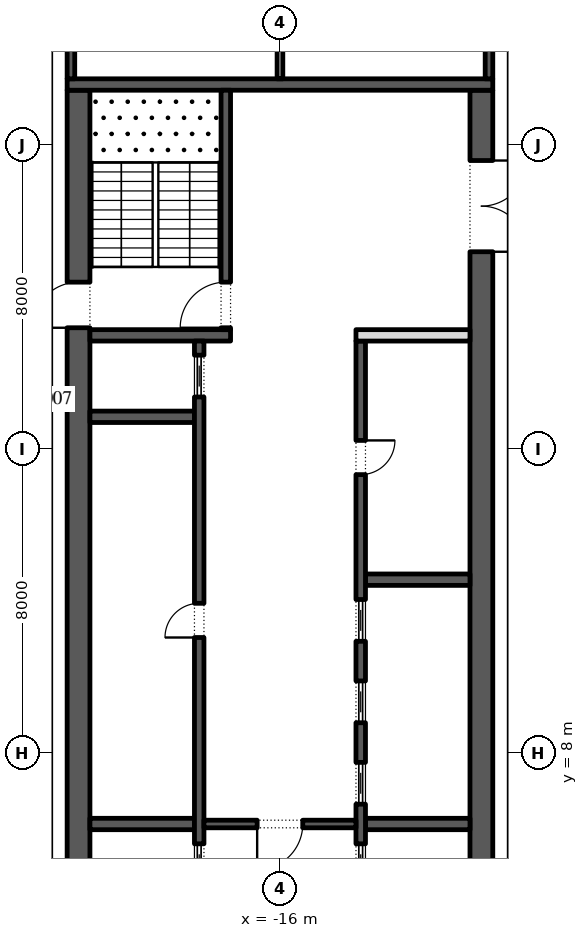
"""IFC4 building model, lengths in metres.
Left out: names, types, materials, properties, quantities, classifications, styles, units other than length and angle.
Written with IfcOpenShell. Run it as: python <this file> out.ifc"""

import sys

from ifc_helpers import new_model, si_unit, direction, frame, frame_2d, origin, place, context, subcontext, project, spatial, rectangle, extrude, element, fill, save


model = new_model("IFC4")
c1 = context("Model", 3, precision=1e-05, world=origin(), true_north=direction((0.0, 1.0)))
c2 = subcontext(c1, "Body", "Model", "MODEL_VIEW")
j1 = project(units=[si_unit("LENGTHUNIT", "METRE"), si_unit("PLANEANGLEUNIT", "RADIAN")], contexts=[c1])
p1 = place(None, origin())
s1 = spatial("IfcSite", under=j1, at=p1, CompositionType="ELEMENT")
p2 = place(p1, origin())
s2 = spatial("IfcBuilding", under=s1, at=p2, CompositionType="ELEMENT")
p3 = place(p2, frame((0.0, 0.0, 259.8)))
s3 = spatial("IfcBuildingStorey", under=s2, at=p3, CompositionType="ELEMENT", Elevation=259.8)
p4 = place(p3, frame((-21.359, 48.678, 0.0), z_axis=(0.0, 0.0, 1.0), x_axis=(-0.224949198343, -0.974370493275, 0.0)))
e1 = element("IfcWall", 1, at=p4, inside=s3, PredefinedType="STANDARD", context=c2, shape_type="SweptSolid", body=[
    extrude(rectangle(XDim=49.5, YDim=0.3, at=frame_2d((24.75, 0.0))), origin(), (0.0, 0.0, 1.0), 4.0),
])
p5 = place(p4, frame((1.157, 0.0, 0.45)))
e2 = element("IfcOpeningElement", 2, at=p5, cuts=e1, PredefinedType="OPENING", context=c2, shape_type="SweptSolid", body=[
    extrude(rectangle(XDim=4.5, YDim=3.05, at=frame_2d((2.25, 1.525))), frame((0.0, 0.16, 0.0), z_axis=(0.0, -1.0, 0.0), x_axis=(1.0, 0.0, 0.0)), (0.0, 0.0, 1.0), 0.32),
])
p6 = place(p4, frame((9.171, 0.0, 0.0)))
e3 = element("IfcOpeningElement", 3, at=p6, cuts=e1, PredefinedType="OPENING", context=c2, shape_type="SweptSolid", body=[
    extrude(rectangle(XDim=2.4, YDim=3.5, at=frame_2d((1.2, 1.75))), frame((0.0, 0.16, 0.0), z_axis=(0.0, -1.0, 0.0), x_axis=(1.0, 0.0, 0.0)), (0.0, 0.0, 1.0), 0.32),
])
p7 = place(p4, frame((15.236, 0.0, 0.45)))
e4 = element("IfcOpeningElement", 4, at=p7, cuts=e1, PredefinedType="OPENING", context=c2, shape_type="SweptSolid", body=[
    extrude(rectangle(XDim=4.5, YDim=3.05, at=frame_2d((2.25, 1.525))), frame((0.0, 0.16, 0.0), z_axis=(0.0, -1.0, 0.0), x_axis=(1.0, 0.0, 0.0)), (0.0, 0.0, 1.0), 0.32),
])
p8 = place(p4, frame((22.35, 0.0, 0.45)))
e5 = element("IfcOpeningElement", 5, at=p8, cuts=e1, PredefinedType="OPENING", context=c2, shape_type="SweptSolid", body=[
    extrude(rectangle(XDim=4.5, YDim=3.05, at=frame_2d((2.25, 1.525))), frame((0.0, 0.16, 0.0), z_axis=(0.0, -1.0, 0.0), x_axis=(1.0, 0.0, 0.0)), (0.0, 0.0, 1.0), 0.32),
])
p9 = place(p4, frame((29.464, 0.0, 0.45)))
e6 = element("IfcOpeningElement", 6, at=p9, cuts=e1, PredefinedType="OPENING", context=c2, shape_type="SweptSolid", body=[
    extrude(rectangle(XDim=4.5, YDim=3.05, at=frame_2d((2.25, 1.525))), frame((0.0, 0.16, 0.0), z_axis=(0.0, -1.0, 0.0), x_axis=(1.0, 0.0, 0.0)), (0.0, 0.0, 1.0), 0.32),
])
p10 = place(p4, frame((37.628, 0.0, 0.0)))
e7 = element("IfcOpeningElement", 7, at=p10, cuts=e1, PredefinedType="OPENING", context=c2, shape_type="SweptSolid", body=[
    extrude(rectangle(XDim=2.4, YDim=3.325, at=frame_2d((1.2, 1.663))), frame((0.0, 0.16, 0.0), z_axis=(0.0, -1.0, 0.0), x_axis=(1.0, 0.0, 0.0)), (0.0, 0.0, 1.0), 0.32),
])
p11 = place(p4, frame((43.693, 0.0, 0.45)))
e8 = element("IfcOpeningElement", 8, at=p11, cuts=e1, PredefinedType="OPENING", context=c2, shape_type="SweptSolid", body=[
    extrude(rectangle(XDim=4.5, YDim=2.825, at=frame_2d((2.25, 1.413))), frame((0.0, 0.16, 0.0), z_axis=(0.0, -1.0, 0.0), x_axis=(1.0, 0.0, 0.0)), (0.0, 0.0, 1.0), 0.32),
])
p12 = place(p3, frame((-21.3, -2.45, 0.0), z_axis=(0.0, 0.0, 1.0), x_axis=(0.0, 1.0, 0.0)))
e9 = element("IfcWall", 9, at=p12, inside=s3, PredefinedType="SHEAR", context=c2, shape_type="SweptSolid", body=[
    extrude(rectangle(XDim=27.9, YDim=0.6, at=frame_2d((13.95, 0.0))), origin(), (0.0, 0.0, 1.0), 4.0),
])
p13 = place(p12, frame((5.05, 0.0, 0.0)))
e10 = element("IfcOpeningElement", 10, at=p13, cuts=e9, PredefinedType="OPENING", context=c2, shape_type="SweptSolid", body=[
    extrude(rectangle(XDim=1.2, YDim=2.1, at=frame_2d((0.6, 1.05))), frame((0.0, 0.31, 0.0), z_axis=(0.0, -1.0, 0.0), x_axis=(1.0, 0.0, 0.0)), (0.0, 0.0, 1.0), 0.62),
])
p14 = place(p12, frame((21.65, 0.0, 0.0)))
e11 = element("IfcOpeningElement", 11, at=p14, cuts=e9, PredefinedType="OPENING", context=c2, shape_type="SweptSolid", body=[
    extrude(rectangle(XDim=1.2, YDim=2.1, at=frame_2d((0.6, 1.05))), frame((0.0, 0.31, 0.0), z_axis=(0.0, -1.0, 0.0), x_axis=(1.0, 0.0, 0.0)), (0.0, 0.0, 1.0), 0.62),
])
p15 = place(p3, frame((-10.7, -2.45, 0.0), z_axis=(0.0, 0.0, 1.0), x_axis=(0.0, 1.0, 0.0)))
e12 = element("IfcWall", 12, at=p15, inside=s3, PredefinedType="SHEAR", context=c2, shape_type="SweptSolid", body=[
    extrude(rectangle(XDim=27.9, YDim=0.6, at=frame_2d((13.95, 0.0))), origin(), (0.0, 0.0, 1.0), 4.0),
])
p16 = place(p15, frame((23.65, 0.0, 0.0)))
e13 = element("IfcOpeningElement", 13, at=p16, cuts=e12, PredefinedType="OPENING", context=c2, shape_type="SweptSolid", body=[
    extrude(rectangle(XDim=2.4, YDim=2.1, at=frame_2d((1.2, 1.05))), frame((0.0, 0.31, 0.0), z_axis=(0.0, -1.0, 0.0), x_axis=(1.0, 0.0, 0.0)), (0.0, 0.0, 1.0), 0.62),
])
p17 = place(p15, frame((1.087, 0.0, 0.0)))
e14 = element("IfcOpeningElement", 14, at=p17, cuts=e12, PredefinedType="OPENING", context=c2, shape_type="SweptSolid", body=[
    extrude(rectangle(XDim=0.9, YDim=2.1, at=frame_2d((0.45, 1.05))), frame((0.0, 0.31, 0.0), z_axis=(0.0, -1.0, 0.0), x_axis=(1.0, 0.0, 0.0)), (0.0, 0.0, 1.0), 0.62),
])
p18 = place(p15, frame((4.262, 0.0, 0.0)))
e15 = element("IfcOpeningElement", 15, at=p18, cuts=e12, PredefinedType="OPENING", context=c2, shape_type="SweptSolid", body=[
    extrude(rectangle(XDim=1.0, YDim=2.1, at=frame_2d((0.5, 1.05))), frame((0.0, 0.31, 0.0), z_axis=(0.0, -1.0, 0.0), x_axis=(1.0, 0.0, 0.0)), (0.0, 0.0, 1.0), 0.62),
])
p19 = place(p3, frame((-21.6, 25.6, 0.0), z_axis=(0.0, 0.0, 1.0), x_axis=(1.0, 0.0, 0.0)))
e16 = element("IfcWall", 16, at=p19, inside=s3, PredefinedType="SHEAR", context=c2, shape_type="SweptSolid", body=[
    extrude(rectangle(XDim=11.2, YDim=0.3, at=frame_2d((5.6, 0.0))), origin(), (0.0, 0.0, 1.0), 4.0),
])
p20 = place(p3, frame((-21.0, 19.0, 0.0), z_axis=(0.0, 0.0, 1.0), x_axis=(1.0, 0.0, 0.0)))
e17 = element("IfcWall", 17, at=p20, inside=s3, PredefinedType="SHEAR", context=c2, shape_type="SweptSolid", body=[
    extrude(rectangle(XDim=3.7, YDim=0.3, at=frame_2d((1.85, 0.0))), origin(), (0.0, 0.0, 1.0), 4.0),
])
p21 = place(p3, frame((-17.425, 19.15, 0.0), z_axis=(0.0, 0.0, 1.0), x_axis=(0.0, 1.0, 0.0)))
e18 = element("IfcWall", 18, at=p21, inside=s3, PredefinedType="SHEAR", context=c2, shape_type="SweptSolid", body=[
    extrude(rectangle(XDim=6.3, YDim=0.25, at=frame_2d((3.15, 0.0))), origin(), (0.0, 0.0, 1.0), 4.0),
])
p22 = place(p21, frame((0.05, 0.0, 0.0)))
e19 = element("IfcOpeningElement", 19, at=p22, cuts=e18, PredefinedType="OPENING", context=c2, shape_type="SweptSolid", body=[
    extrude(rectangle(XDim=1.2, YDim=2.1, at=frame_2d((0.6, 1.05))), frame((0.0, 0.135, 0.0), z_axis=(0.0, -1.0, 0.0), x_axis=(1.0, 0.0, 0.0)), (0.0, 0.0, 1.0), 0.27),
])
for number, where, z_axis, x_axis in (
    (20, (-21.0, 6.143, 0.0), (0.0, 0.0, 1.0), (1.0, 0.0, 0.0)),
    (21, (-21.0, 16.857, 0.0), (0.0, 0.0, 1.0), (1.0, 0.0, 0.0)),
):
    element("IfcWall", number, at=place(p3, frame(where, z_axis=z_axis, x_axis=x_axis)), inside=s3, PredefinedType="SHEAR", context=c2, shape_type="SweptSolid", body=[
        extrude(rectangle(XDim=2.75, YDim=0.3, at=frame_2d((1.375, 0.0))), origin(), (0.0, 0.0, 1.0), 4.0),
    ])
p23 = place(p3, frame((-18.125, 4.15, 0.0), z_axis=(0.0, 0.0, 1.0), x_axis=(0.0, 1.0, 0.0)))
e22 = element("IfcWall", 22, at=p23, inside=s3, PredefinedType="SHEAR", context=c2, shape_type="SweptSolid", body=[
    extrude(rectangle(XDim=14.7, YDim=0.25, at=frame_2d((7.35, 0.0))), origin(), (0.0, 0.0, 1.0), 4.0),
])
p24 = place(p23, frame((6.9, 0.0, 0.0)))
e23 = element("IfcOpeningElement", 23, at=p24, cuts=e22, PredefinedType="OPENING", context=c2, shape_type="SweptSolid", body=[
    extrude(rectangle(XDim=0.9, YDim=2.1, at=frame_2d((0.45, 1.05))), frame((0.0, 0.135, 0.0), z_axis=(0.0, -1.0, 0.0), x_axis=(1.0, 0.0, 0.0)), (0.0, 0.0, 1.0), 0.27),
])
p25 = place(p23, frame((0.371, 0.0, 0.0)))
e24 = element("IfcOpeningElement", 24, at=p25, cuts=e22, PredefinedType="OPENING", context=c2, shape_type="SweptSolid", body=[
    extrude(rectangle(XDim=1.1, YDim=2.1, at=frame_2d((0.55, 1.05))), frame((0.0, 0.135, 0.0), z_axis=(0.0, -1.0, 0.0), x_axis=(1.0, 0.0, 0.0)), (0.0, 0.0, 1.0), 0.27),
])
p26 = place(p23, frame((13.229, 0.0, 0.0)))
e25 = element("IfcOpeningElement", 25, at=p26, cuts=e22, PredefinedType="OPENING", context=c2, shape_type="SweptSolid", body=[
    extrude(rectangle(XDim=1.1, YDim=2.1, at=frame_2d((0.55, 1.05))), frame((0.0, 0.135, 0.0), z_axis=(0.0, -1.0, 0.0), x_axis=(1.0, 0.0, 0.0)), (0.0, 0.0, 1.0), 0.27),
])
for number, where, z_axis, x_axis in (
    (26, (-13.75, 6.143, 0.0), (0.0, 0.0, 1.0), (1.0, 0.0, 0.0)),
    (27, (-13.75, 12.571, 0.0), (0.0, 0.0, 1.0), (1.0, 0.0, 0.0)),
):
    element("IfcWall", number, at=place(p3, frame(where, z_axis=z_axis, x_axis=x_axis)), inside=s3, PredefinedType="SHEAR", context=c2, shape_type="SweptSolid", body=[
        extrude(rectangle(XDim=2.75, YDim=0.3, at=frame_2d((1.375, 0.0))), origin(), (0.0, 0.0, 1.0), 4.0),
    ])
p27 = place(p3, frame((-13.875, -2.45, 0.0), z_axis=(0.0, 0.0, 1.0), x_axis=(0.0, 1.0, 0.0)))
e28 = element("IfcWall", 28, at=p27, inside=s3, PredefinedType="SHEAR", context=c2, shape_type="SweptSolid", body=[
    extrude(rectangle(XDim=21.3, YDim=0.25, at=frame_2d((10.65, 0.0))), origin(), (0.0, 0.0, 1.0), 4.0),
])
p28 = place(p27, frame((17.786, 0.0, 0.0)))
e29 = element("IfcOpeningElement", 29, at=p28, cuts=e28, PredefinedType="OPENING", context=c2, shape_type="SweptSolid", body=[
    extrude(rectangle(XDim=0.9, YDim=2.1, at=frame_2d((0.45, 1.05))), frame((0.0, 0.135, 0.0), z_axis=(0.0, -1.0, 0.0), x_axis=(1.0, 0.0, 0.0)), (0.0, 0.0, 1.0), 0.27),
])
p29 = place(p27, frame((6.971, 0.0, 0.0)))
e30 = element("IfcOpeningElement", 30, at=p29, cuts=e28, PredefinedType="OPENING", context=c2, shape_type="SweptSolid", body=[
    extrude(rectangle(XDim=1.1, YDim=2.1, at=frame_2d((0.55, 1.05))), frame((0.0, 0.135, 0.0), z_axis=(0.0, -1.0, 0.0), x_axis=(1.0, 0.0, 0.0)), (0.0, 0.0, 1.0), 0.27),
])
p30 = place(p27, frame((9.114, 0.0, 0.0)))
e31 = element("IfcOpeningElement", 31, at=p30, cuts=e28, PredefinedType="OPENING", context=c2, shape_type="SweptSolid", body=[
    extrude(rectangle(XDim=1.1, YDim=2.1, at=frame_2d((0.55, 1.05))), frame((0.0, 0.135, 0.0), z_axis=(0.0, -1.0, 0.0), x_axis=(1.0, 0.0, 0.0)), (0.0, 0.0, 1.0), 0.27),
])
p31 = place(p27, frame((11.257, 0.0, 0.0)))
e32 = element("IfcOpeningElement", 32, at=p31, cuts=e28, PredefinedType="OPENING", context=c2, shape_type="SweptSolid", body=[
    extrude(rectangle(XDim=1.1, YDim=2.1, at=frame_2d((0.55, 1.05))), frame((0.0, 0.135, 0.0), z_axis=(0.0, -1.0, 0.0), x_axis=(1.0, 0.0, 0.0)), (0.0, 0.0, 1.0), 0.27),
])
p32 = place(p27, frame((13.4, 0.0, 0.0)))
e33 = element("IfcOpeningElement", 33, at=p32, cuts=e28, PredefinedType="OPENING", context=c2, shape_type="SweptSolid", body=[
    extrude(rectangle(XDim=1.1, YDim=2.1, at=frame_2d((0.55, 1.05))), frame((0.0, 0.135, 0.0), z_axis=(0.0, -1.0, 0.0), x_axis=(1.0, 0.0, 0.0)), (0.0, 0.0, 1.0), 0.27),
])
p33 = place(p3, frame((-14.0, 19.0, 0.0), z_axis=(0.0, 0.0, 1.0), x_axis=(1.0, 0.0, 0.0)))
e34 = element("IfcWall", 34, at=p33, inside=s3, PredefinedType="PARTITIONING", context=c2, shape_type="SweptSolid", body=[
    extrude(rectangle(XDim=3.0, YDim=0.3, at=frame_2d((1.5, 0.0))), origin(), (0.0, 0.0, 1.0), 4.0),
])
p34 = place(p3, frame((-18.0, 6.143, 0.0), z_axis=(0.0, 0.0, 1.0), x_axis=(1.0, 0.0, 0.0)))
e35 = element("IfcWall", 35, at=p34, inside=s3, PredefinedType="SHEAR", context=c2, shape_type="SweptSolid", body=[
    extrude(rectangle(XDim=4.0, YDim=0.2, at=frame_2d((2.0, 0.0))), origin(), (0.0, 0.0, 1.0), 4.0),
])
p35 = place(p34, frame((1.4, 0.0, 0.0)))
e36 = element("IfcOpeningElement", 36, at=p35, cuts=e35, PredefinedType="OPENING", context=c2, shape_type="SweptSolid", body=[
    extrude(rectangle(XDim=1.2, YDim=2.1, at=frame_2d((0.6, 1.05))), frame((0.0, 0.11, 0.0), z_axis=(0.0, -1.0, 0.0), x_axis=(1.0, 0.0, 0.0)), (0.0, 0.0, 1.0), 0.22),
])
p36 = place(p3, frame((-21.5, 25.75, 0.0), z_axis=(0.0, 0.0, 1.0), x_axis=(0.0, 1.0, 0.0)))
e37 = element("IfcWall", 37, at=p36, inside=s3, PredefinedType="SHEAR", context=c2, shape_type="SweptSolid", body=[
    extrude(rectangle(XDim=4.75, YDim=0.2, at=frame_2d((2.375, 0.0))), origin(), (0.0, 0.0, 1.0), 4.0),
])
p37 = place(p36, frame((1.925, 0.0, 0.0)))
e38 = element("IfcOpeningElement", 38, at=p37, cuts=e37, PredefinedType="OPENING", context=c2, shape_type="SweptSolid", body=[
    extrude(rectangle(XDim=0.9, YDim=2.1, at=frame_2d((0.45, 1.05))), frame((0.0, 0.11, 0.0), z_axis=(0.0, -1.0, 0.0), x_axis=(1.0, 0.0, 0.0)), (0.0, 0.0, 1.0), 0.22),
])
p38 = place(p3, frame((-10.5, 25.75, 0.0), z_axis=(0.0, 0.0, 1.0), x_axis=(0.0, 1.0, 0.0)))
e39 = element("IfcWall", 39, at=p38, inside=s3, PredefinedType="SHEAR", context=c2, shape_type="SweptSolid", body=[
    extrude(rectangle(XDim=4.75, YDim=0.2, at=frame_2d((2.375, 0.0))), origin(), (0.0, 0.0, 1.0), 4.0),
])
p39 = place(p38, frame((1.925, 0.0, 0.0)))
e40 = element("IfcOpeningElement", 40, at=p39, cuts=e39, PredefinedType="OPENING", context=c2, shape_type="SweptSolid", body=[
    extrude(rectangle(XDim=0.9, YDim=2.1, at=frame_2d((0.45, 1.05))), frame((0.0, 0.11, 0.0), z_axis=(0.0, -1.0, 0.0), x_axis=(1.0, 0.0, 0.0)), (0.0, 0.0, 1.0), 0.22),
])
p40 = place(p3, frame((-16.0, 25.75, 0.0), z_axis=(0.0, 0.0, 1.0), x_axis=(0.0, 1.0, 0.0)))
e41 = element("IfcWall", 41, at=p40, inside=s3, PredefinedType="PARTITIONING", context=c2, shape_type="SweptSolid", body=[
    extrude(rectangle(XDim=4.75, YDim=0.15, at=frame_2d((2.375, 0.0))), origin(), (0.0, 0.0, 1.0), 4.0),
])
p41 = place(p24, origin())
e42 = element("IfcDoor", 42, at=p41, inside=s3, OperationType="SINGLE_SWING_RIGHT", PredefinedType="DOOR", context=c2, shape_type="SweptSolid", body=[
    extrude(rectangle(XDim=0.9, YDim=2.1, at=frame_2d((0.45, 1.05))), frame((0.0, 0.125, 0.0), z_axis=(0.0, -1.0, 0.0), x_axis=(1.0, 0.0, 0.0)), (0.0, 0.0, 1.0), 0.05),
])
fill(e23, e42)
p42 = place(p25, origin())
e43 = element("IfcDoor", 43, at=p42, inside=s3, OperationType="SLIDING_TO_LEFT", PredefinedType="DOOR", context=c2, shape_type="SweptSolid", body=[
    extrude(rectangle(XDim=1.1, YDim=2.1, at=frame_2d((0.55, 1.05))), frame((0.0, 0.025, 0.0), z_axis=(0.0, -1.0, 0.0), x_axis=(1.0, 0.0, 0.0)), (0.0, 0.0, 1.0), 0.05),
])
fill(e24, e43)
p43 = place(p26, origin())
e44 = element("IfcDoor", 44, at=p43, inside=s3, OperationType="SLIDING_TO_LEFT", PredefinedType="DOOR", context=c2, shape_type="SweptSolid", body=[
    extrude(rectangle(XDim=1.1, YDim=2.1, at=frame_2d((0.55, 1.05))), frame((0.0, 0.025, 0.0), z_axis=(0.0, -1.0, 0.0), x_axis=(1.0, 0.0, 0.0)), (0.0, 0.0, 1.0), 0.05),
])
fill(e25, e44)
p44 = place(p28, frame((0.9, -0.2, 0.0), z_axis=(0.0, 0.0, 1.0), x_axis=(-1.0, 0.0, 0.0)))
e45 = element("IfcDoor", 45, at=p44, inside=s3, OperationType="SINGLE_SWING_RIGHT", PredefinedType="DOOR", context=c2, shape_type="SweptSolid", body=[
    extrude(rectangle(XDim=0.9, YDim=2.1, at=frame_2d((0.45, 1.05))), frame((0.0, -0.075, 0.0), z_axis=(0.0, -1.0, 0.0), x_axis=(1.0, 0.0, 0.0)), (0.0, 0.0, 1.0), 0.05),
])
fill(e29, e45)
p45 = place(p29, origin())
e46 = element("IfcDoor", 46, at=p45, inside=s3, OperationType="SLIDING_TO_LEFT", PredefinedType="DOOR", context=c2, shape_type="SweptSolid", body=[
    extrude(rectangle(XDim=1.1, YDim=2.1, at=frame_2d((0.55, 1.05))), frame((0.0, 0.025, 0.0), z_axis=(0.0, -1.0, 0.0), x_axis=(1.0, 0.0, 0.0)), (0.0, 0.0, 1.0), 0.05),
])
fill(e30, e46)
p46 = place(p30, origin())
e47 = element("IfcDoor", 47, at=p46, inside=s3, OperationType="SLIDING_TO_LEFT", PredefinedType="DOOR", context=c2, shape_type="SweptSolid", body=[
    extrude(rectangle(XDim=1.1, YDim=2.1, at=frame_2d((0.55, 1.05))), frame((0.0, 0.025, 0.0), z_axis=(0.0, -1.0, 0.0), x_axis=(1.0, 0.0, 0.0)), (0.0, 0.0, 1.0), 0.05),
])
fill(e31, e47)
p47 = place(p31, origin())
e48 = element("IfcDoor", 48, at=p47, inside=s3, OperationType="SLIDING_TO_LEFT", PredefinedType="DOOR", context=c2, shape_type="SweptSolid", body=[
    extrude(rectangle(XDim=1.1, YDim=2.1, at=frame_2d((0.55, 1.05))), frame((0.0, 0.025, 0.0), z_axis=(0.0, -1.0, 0.0), x_axis=(1.0, 0.0, 0.0)), (0.0, 0.0, 1.0), 0.05),
])
fill(e32, e48)
p48 = place(p32, origin())
e49 = element("IfcDoor", 49, at=p48, inside=s3, OperationType="SLIDING_TO_LEFT", PredefinedType="DOOR", context=c2, shape_type="SweptSolid", body=[
    extrude(rectangle(XDim=1.1, YDim=2.1, at=frame_2d((0.55, 1.05))), frame((0.0, 0.025, 0.0), z_axis=(0.0, -1.0, 0.0), x_axis=(1.0, 0.0, 0.0)), (0.0, 0.0, 1.0), 0.05),
])
fill(e33, e49)
p49 = place(p35, frame((1.2, 0.0, 0.0), z_axis=(0.0, 0.0, 1.0), x_axis=(-1.0, 0.0, 0.0)))
e50 = element("IfcDoor", 50, at=p49, inside=s3, OperationType="SINGLE_SWING_LEFT", PredefinedType="DOOR", context=c2, shape_type="SweptSolid", body=[
    extrude(rectangle(XDim=1.2, YDim=2.1, at=frame_2d((0.6, 1.05))), frame((0.0, 0.025, 0.0), z_axis=(0.0, -1.0, 0.0), x_axis=(1.0, 0.0, 0.0)), (0.0, 0.0, 1.0), 0.05),
])
fill(e36, e50)
p50 = place(p16, frame((2.4, 0.0, 0.0), z_axis=(0.0, 0.0, 1.0), x_axis=(-1.0, 0.0, 0.0)))
e51 = element("IfcDoor", 51, at=p50, inside=s3, OperationType="DOUBLE_DOOR_SINGLE_SWING", PredefinedType="DOOR", context=c2, shape_type="SweptSolid", body=[
    extrude(rectangle(XDim=2.4, YDim=2.1, at=frame_2d((1.2, 1.05))), frame((0.0, 0.025, 0.0), z_axis=(0.0, -1.0, 0.0), x_axis=(1.0, 0.0, 0.0)), (0.0, 0.0, 1.0), 0.05),
])
fill(e13, e51)
p51 = place(p22, origin())
e52 = element("IfcDoor", 52, at=p51, inside=s3, OperationType="SINGLE_SWING_RIGHT", PredefinedType="DOOR", context=c2, shape_type="SweptSolid", body=[
    extrude(rectangle(XDim=1.2, YDim=2.1, at=frame_2d((0.6, 1.05))), frame((0.0, 0.025, 0.0), z_axis=(0.0, -1.0, 0.0), x_axis=(1.0, 0.0, 0.0)), (0.0, 0.0, 1.0), 0.05),
])
fill(e19, e52)
p52 = place(p14, origin())
e53 = element("IfcDoor", 53, at=p52, inside=s3, OperationType="SINGLE_SWING_RIGHT", PredefinedType="DOOR", context=c2, shape_type="SweptSolid", body=[
    extrude(rectangle(XDim=1.2, YDim=2.1, at=frame_2d((0.6, 1.05))), frame((0.0, 0.025, 0.0), z_axis=(0.0, -1.0, 0.0), x_axis=(1.0, 0.0, 0.0)), (0.0, 0.0, 1.0), 0.05),
])
fill(e11, e53)
save(model, sys.argv[1])
